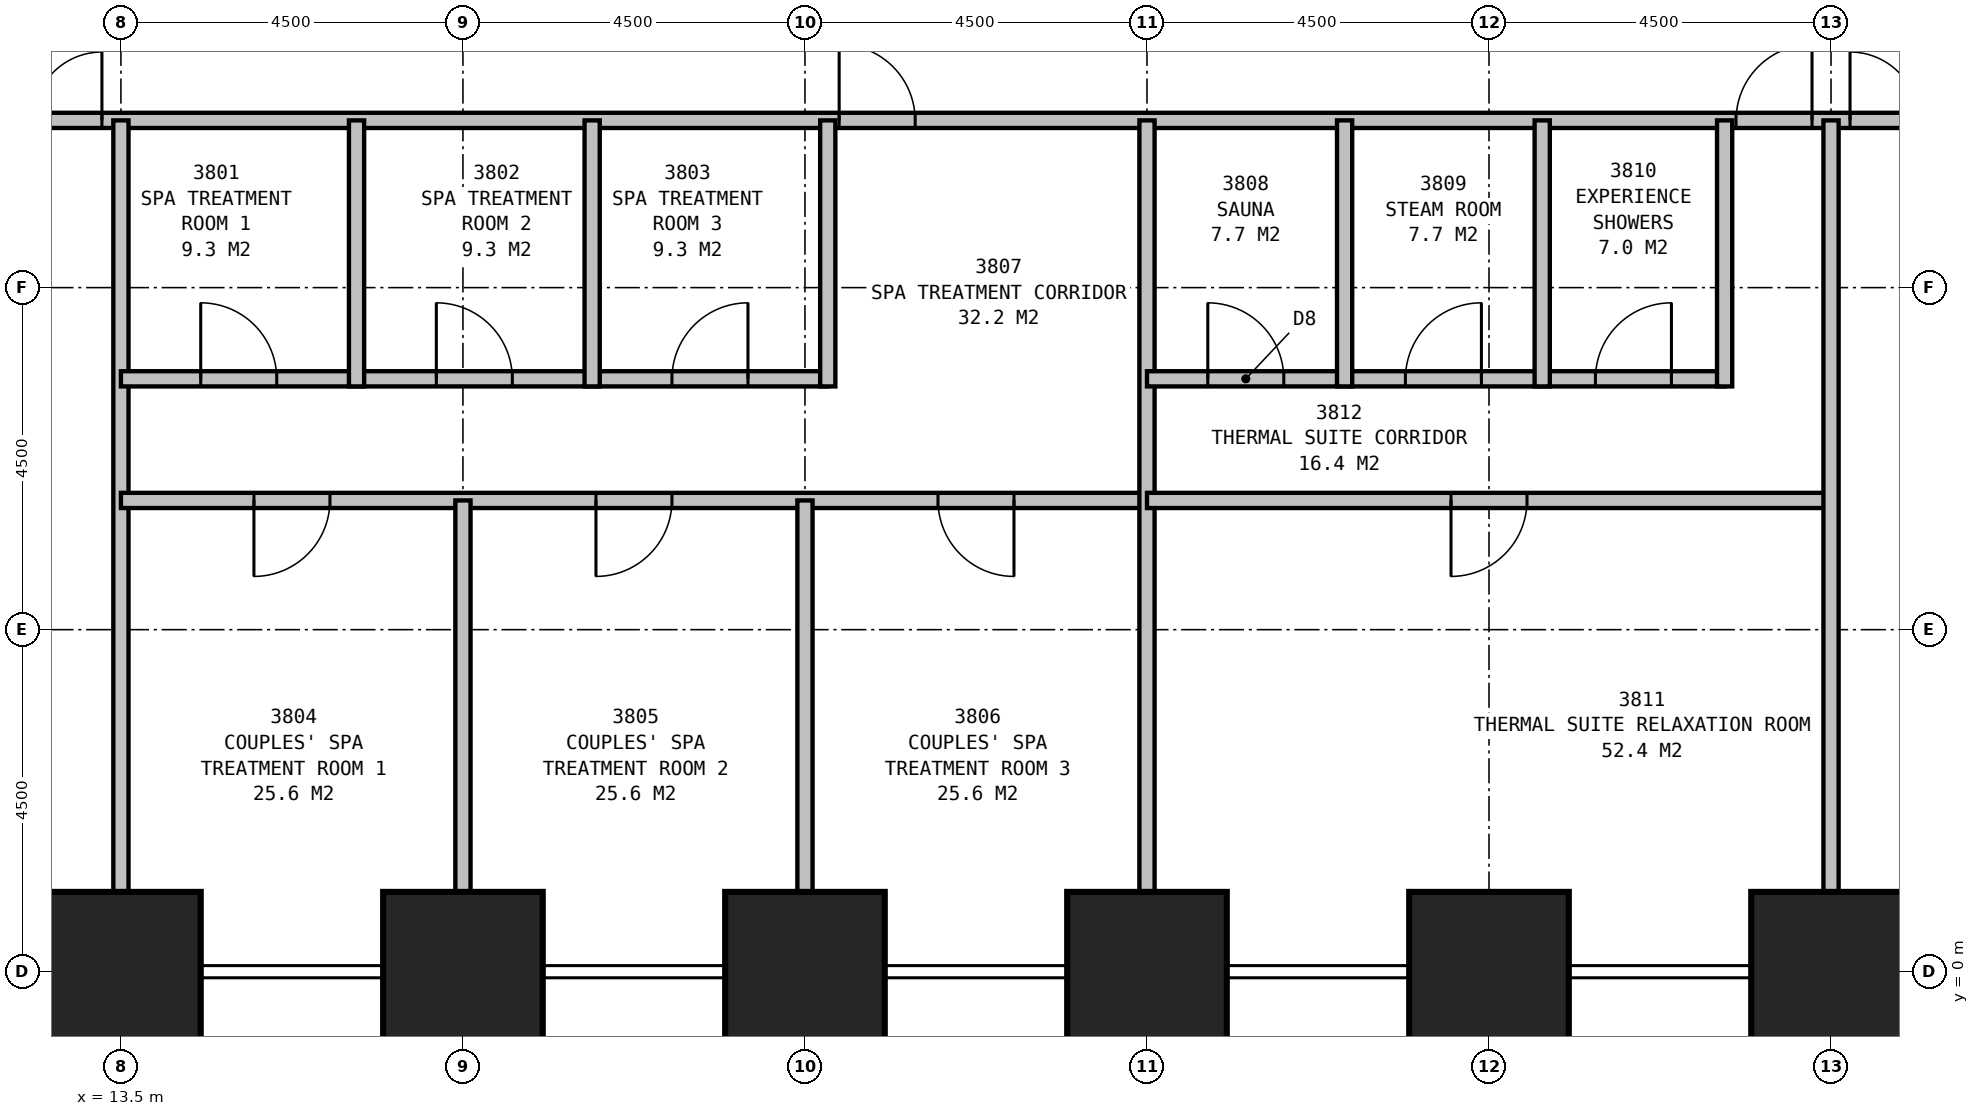
"""IFC4 building model, lengths in metres.
Left out: names, types, materials, properties, quantities, classifications, styles, units other than length and angle.
Written with IfcOpenShell. Run it as: python <this file> out.ifc"""

import sys

from ifc_helpers import new_model, si_unit, direction, frame, frame_2d, origin, origin_2d, place, context, subcontext, project, spatial, rectangle, extrude, element, fill, save


model = new_model("IFC4")
c1 = context("Model", 3, precision=1e-05, world=origin(), true_north=direction((0.0, 1.0)))
c2 = subcontext(c1, "Body", "Model", "MODEL_VIEW")
j1 = project(units=[si_unit("LENGTHUNIT", "METRE"), si_unit("PLANEANGLEUNIT", "RADIAN")], contexts=[c1])
p1 = place(None, origin())
s1 = spatial("IfcSite", under=j1, at=p1, CompositionType="ELEMENT")
p2 = place(p1, origin())
s2 = spatial("IfcBuilding", under=s1, at=p2, CompositionType="ELEMENT")
p3 = place(p2, frame((0.0, 0.0, 145.9)))
s3 = spatial("IfcBuildingStorey", under=s2, at=p3, CompositionType="ELEMENT", Elevation=145.9)
for number, where, z_axis, x_axis in (
    (1, (13.5, 0.0, 0.0), (0.0, 0.0, 1.0), (1.0, 0.0, 0.0)),
    (2, (18.0, 0.0, 0.0), (0.0, 0.0, 1.0), (1.0, 0.0, 0.0)),
    (3, (22.5, 0.0, 0.0), (0.0, 0.0, 1.0), (1.0, 0.0, 0.0)),
    (4, (27.0, 0.0, 0.0), (0.0, 0.0, 1.0), (1.0, 0.0, 0.0)),
    (5, (31.5, 0.0, 0.0), (0.0, 0.0, 1.0), (1.0, 0.0, 0.0)),
    (6, (36.0, 0.0, 0.0), (0.0, 0.0, 1.0), (1.0, 0.0, 0.0)),
):
    element("IfcColumn", number, at=place(p3, frame(where, z_axis=z_axis, x_axis=x_axis)), inside=s3, PredefinedType="COLUMN", context=c2, shape_type="SweptSolid", body=[
        extrude(rectangle(XDim=2.1, YDim=2.1, at=origin_2d()), origin(), (0.0, 0.0, 1.0), 6.0),
    ])
p4 = place(p3, frame((11.2, 11.2, 0.0), z_axis=(0.0, 0.0, 1.0), x_axis=(1.0, 0.0, 0.0)))
e7 = element("IfcWall", 7, at=p4, inside=s3, PredefinedType="PARTITIONING", context=c2, shape_type="SweptSolid", body=[
    extrude(rectangle(XDim=27.1, YDim=0.2, at=frame_2d((13.55, 0.0))), origin(), (0.0, 0.0, 1.0), 5.7),
])
p5 = place(p4, frame((11.75, 0.0, 0.0)))
e8 = element("IfcOpeningElement", 8, at=p5, cuts=e7, PredefinedType="OPENING", context=c2, shape_type="SweptSolid", body=[
    extrude(rectangle(XDim=1.0, YDim=2.1, at=frame_2d((0.5, 1.05))), frame((0.0, 0.11, 0.0), z_axis=(0.0, -1.0, 0.0), x_axis=(1.0, 0.0, 0.0)), (0.0, 0.0, 1.0), 0.22),
])
p6 = place(p4, frame((23.55, 0.0, 0.0)))
e9 = element("IfcOpeningElement", 9, at=p6, cuts=e7, PredefinedType="OPENING", context=c2, shape_type="SweptSolid", body=[
    extrude(rectangle(XDim=1.0, YDim=2.1, at=frame_2d((0.5, 1.05))), frame((0.0, 0.11, 0.0), z_axis=(0.0, -1.0, 0.0), x_axis=(1.0, 0.0, 0.0)), (0.0, 0.0, 1.0), 0.22),
])
p7 = place(p4, frame((0.25, 0.0, 0.0)))
e10 = element("IfcOpeningElement", 10, at=p7, cuts=e7, PredefinedType="OPENING", context=c2, shape_type="SweptSolid", body=[
    extrude(rectangle(XDim=1.8, YDim=2.4, at=frame_2d((0.9, 1.2))), frame((0.0, 0.11, 0.0), z_axis=(0.0, -1.0, 0.0), x_axis=(1.0, 0.0, 0.0)), (0.0, 0.0, 1.0), 0.22),
])
p8 = place(p4, frame((25.05, 0.0, 0.0)))
e11 = element("IfcOpeningElement", 11, at=p8, cuts=e7, PredefinedType="OPENING", context=c2, shape_type="SweptSolid", body=[
    extrude(rectangle(XDim=1.8, YDim=2.4, at=frame_2d((0.9, 1.2))), frame((0.0, 0.11, 0.0), z_axis=(0.0, -1.0, 0.0), x_axis=(1.0, 0.0, 0.0)), (0.0, 0.0, 1.0), 0.22),
])
for number, where, z_axis, x_axis in (
    (12, (13.5, 11.2, 0.0), (0.0, 0.0, 1.0), (0.0, -1.0, 0.0)),
    (13, (27.0, 11.2, 0.0), (0.0, 0.0, 1.0), (0.0, -1.0, 0.0)),
    (14, (36.0, 11.2, 0.0), (0.0, 0.0, 1.0), (0.0, -1.0, 0.0)),
):
    element("IfcWall", number, at=place(p3, frame(where, z_axis=z_axis, x_axis=x_axis)), inside=s3, PredefinedType="PARTITIONING", context=c2, shape_type="SweptSolid", body=[
        extrude(rectangle(XDim=10.15, YDim=0.2, at=frame_2d((5.075, 0.0))), origin(), (0.0, 0.0, 1.0), 4.7),
    ])
for number, where, z_axis, x_axis in (
    (15, (16.6, 11.2, 0.0), (0.0, 0.0, 1.0), (0.0, -1.0, 0.0)),
    (16, (19.7, 11.2, 0.0), (0.0, 0.0, 1.0), (0.0, -1.0, 0.0)),
):
    element("IfcWall", number, at=place(p3, frame(where, z_axis=z_axis, x_axis=x_axis)), inside=s3, PredefinedType="PARTITIONING", context=c2, shape_type="SweptSolid", body=[
        extrude(rectangle(XDim=3.5, YDim=0.2, at=frame_2d((1.75, 0.0))), origin(), (0.0, 0.0, 1.0), 5.7),
    ])
p9 = place(p3, frame((22.8, 11.2, 0.0), z_axis=(0.0, 0.0, 1.0), x_axis=(0.0, -1.0, 0.0)))
e17 = element("IfcWall", 17, at=p9, inside=s3, PredefinedType="PARTITIONING", context=c2, shape_type="SweptSolid", body=[
    extrude(rectangle(XDim=3.5, YDim=0.2, at=frame_2d((1.75, 0.0))), origin(), (0.0, 0.0, 1.0), 4.7),
])
p10 = place(p3, frame((13.5, 7.8, 0.0), z_axis=(0.0, 0.0, 1.0), x_axis=(1.0, 0.0, 0.0)))
e18 = element("IfcWall", 18, at=p10, inside=s3, PredefinedType="PARTITIONING", context=c2, shape_type="SweptSolid", body=[
    extrude(rectangle(XDim=9.3, YDim=0.2, at=frame_2d((4.65, 0.0))), origin(), (0.0, 0.0, 1.0), 5.7),
])
p11 = place(p10, frame((1.05, 0.0, 0.0)))
e19 = element("IfcOpeningElement", 19, at=p11, cuts=e18, PredefinedType="OPENING", context=c2, shape_type="SweptSolid", body=[
    extrude(rectangle(XDim=1.0, YDim=2.1, at=frame_2d((0.5, 1.05))), frame((0.0, 0.11, 0.0), z_axis=(0.0, -1.0, 0.0), x_axis=(1.0, 0.0, 0.0)), (0.0, 0.0, 1.0), 0.22),
])
p12 = place(p10, frame((4.15, 0.0, 0.0)))
e20 = element("IfcOpeningElement", 20, at=p12, cuts=e18, PredefinedType="OPENING", context=c2, shape_type="SweptSolid", body=[
    extrude(rectangle(XDim=1.0, YDim=2.1, at=frame_2d((0.5, 1.05))), frame((0.0, 0.11, 0.0), z_axis=(0.0, -1.0, 0.0), x_axis=(1.0, 0.0, 0.0)), (0.0, 0.0, 1.0), 0.22),
])
p13 = place(p10, frame((7.25, 0.0, 0.0)))
e21 = element("IfcOpeningElement", 21, at=p13, cuts=e18, PredefinedType="OPENING", context=c2, shape_type="SweptSolid", body=[
    extrude(rectangle(XDim=1.0, YDim=2.1, at=frame_2d((0.5, 1.05))), frame((0.0, 0.11, 0.0), z_axis=(0.0, -1.0, 0.0), x_axis=(1.0, 0.0, 0.0)), (0.0, 0.0, 1.0), 0.22),
])
p14 = place(p3, frame((13.5, 6.2, 0.0), z_axis=(0.0, 0.0, 1.0), x_axis=(1.0, 0.0, 0.0)))
e22 = element("IfcWall", 22, at=p14, inside=s3, PredefinedType="PARTITIONING", context=c2, shape_type="SweptSolid", body=[
    extrude(rectangle(XDim=13.5, YDim=0.2, at=frame_2d((6.75, 0.0))), origin(), (0.0, 0.0, 1.0), 5.7),
])
p15 = place(p14, frame((2.75, 0.0, 0.0), z_axis=(0.0, 0.0, 1.0), x_axis=(-1.0, 0.0, 0.0)))
e23 = element("IfcOpeningElement", 23, at=p15, cuts=e22, PredefinedType="OPENING", context=c2, shape_type="SweptSolid", body=[
    extrude(rectangle(XDim=1.0, YDim=2.1, at=frame_2d((0.5, 1.05))), frame((0.0, 0.11, 0.0), z_axis=(0.0, -1.0, 0.0), x_axis=(1.0, 0.0, 0.0)), (0.0, 0.0, 1.0), 0.22),
])
p16 = place(p14, frame((7.25, 0.0, 0.0), z_axis=(0.0, 0.0, 1.0), x_axis=(-1.0, 0.0, 0.0)))
e24 = element("IfcOpeningElement", 24, at=p16, cuts=e22, PredefinedType="OPENING", context=c2, shape_type="SweptSolid", body=[
    extrude(rectangle(XDim=1.0, YDim=2.1, at=frame_2d((0.5, 1.05))), frame((0.0, 0.11, 0.0), z_axis=(0.0, -1.0, 0.0), x_axis=(1.0, 0.0, 0.0)), (0.0, 0.0, 1.0), 0.22),
])
p17 = place(p14, frame((11.75, 0.0, 0.0), z_axis=(0.0, 0.0, 1.0), x_axis=(-1.0, 0.0, 0.0)))
e25 = element("IfcOpeningElement", 25, at=p17, cuts=e22, PredefinedType="OPENING", context=c2, shape_type="SweptSolid", body=[
    extrude(rectangle(XDim=1.0, YDim=2.1, at=frame_2d((0.5, 1.05))), frame((0.0, 0.11, 0.0), z_axis=(0.0, -1.0, 0.0), x_axis=(1.0, 0.0, 0.0)), (0.0, 0.0, 1.0), 0.22),
])
for number, where, z_axis, x_axis in (
    (26, (18.0, 6.2, 0.0), (0.0, 0.0, 1.0), (0.0, -1.0, 0.0)),
    (27, (22.5, 6.2, 0.0), (0.0, 0.0, 1.0), (0.0, -1.0, 0.0)),
):
    element("IfcWall", number, at=place(p3, frame(where, z_axis=z_axis, x_axis=x_axis)), inside=s3, PredefinedType="PARTITIONING", context=c2, shape_type="SweptSolid", body=[
        extrude(rectangle(XDim=5.15, YDim=0.2, at=frame_2d((2.575, 0.0))), origin(), (0.0, 0.0, 1.0), 4.7),
    ])
p18 = place(p3, frame((29.6, 11.2, 0.0), z_axis=(0.0, 0.0, 1.0), x_axis=(0.0, -1.0, 0.0)))
e28 = element("IfcWall", 28, at=p18, inside=s3, PredefinedType="PARTITIONING", context=c2, shape_type="SweptSolid", body=[
    extrude(rectangle(XDim=3.5, YDim=0.2, at=frame_2d((1.75, 0.0))), origin(), (0.0, 0.0, 1.0), 5.7),
])
p19 = place(p3, frame((32.2, 11.2, 0.0), z_axis=(0.0, 0.0, 1.0), x_axis=(0.0, -1.0, 0.0)))
e29 = element("IfcWall", 29, at=p19, inside=s3, PredefinedType="PARTITIONING", context=c2, shape_type="SweptSolid", body=[
    extrude(rectangle(XDim=3.5, YDim=0.2, at=frame_2d((1.75, 0.0))), origin(), (0.0, 0.0, 1.0), 4.7),
])
p20 = place(p3, frame((34.6, 11.2, 0.0), z_axis=(0.0, 0.0, 1.0), x_axis=(0.0, -1.0, 0.0)))
e30 = element("IfcWall", 30, at=p20, inside=s3, PredefinedType="PARTITIONING", context=c2, shape_type="SweptSolid", body=[
    extrude(rectangle(XDim=3.5, YDim=0.2, at=frame_2d((1.75, 0.0))), origin(), (0.0, 0.0, 1.0), 5.7),
])
p21 = place(p3, frame((27.0, 7.8, 0.0), z_axis=(0.0, 0.0, 1.0), x_axis=(1.0, 0.0, 0.0)))
e31 = element("IfcWall", 31, at=p21, inside=s3, PredefinedType="PARTITIONING", context=c2, shape_type="SweptSolid", body=[
    extrude(rectangle(XDim=7.6, YDim=0.2, at=frame_2d((3.8, 0.0))), origin(), (0.0, 0.0, 1.0), 5.7),
])
p22 = place(p21, frame((0.8, 0.0, 0.0)))
e32 = element("IfcOpeningElement", 32, at=p22, cuts=e31, PredefinedType="OPENING", context=c2, shape_type="SweptSolid", body=[
    extrude(rectangle(XDim=1.0, YDim=2.1, at=frame_2d((0.5, 1.05))), frame((0.0, 0.11, 0.0), z_axis=(0.0, -1.0, 0.0), x_axis=(1.0, 0.0, 0.0)), (0.0, 0.0, 1.0), 0.22),
])
p23 = place(p21, frame((3.4, 0.0, 0.0)))
e33 = element("IfcOpeningElement", 33, at=p23, cuts=e31, PredefinedType="OPENING", context=c2, shape_type="SweptSolid", body=[
    extrude(rectangle(XDim=1.0, YDim=2.1, at=frame_2d((0.5, 1.05))), frame((0.0, 0.11, 0.0), z_axis=(0.0, -1.0, 0.0), x_axis=(1.0, 0.0, 0.0)), (0.0, 0.0, 1.0), 0.22),
])
p24 = place(p21, frame((5.9, 0.0, 0.0)))
e34 = element("IfcOpeningElement", 34, at=p24, cuts=e31, PredefinedType="OPENING", context=c2, shape_type="SweptSolid", body=[
    extrude(rectangle(XDim=1.0, YDim=2.1, at=frame_2d((0.5, 1.05))), frame((0.0, 0.11, 0.0), z_axis=(0.0, -1.0, 0.0), x_axis=(1.0, 0.0, 0.0)), (0.0, 0.0, 1.0), 0.22),
])
p25 = place(p3, frame((27.0, 6.2, 0.0), z_axis=(0.0, 0.0, 1.0), x_axis=(1.0, 0.0, 0.0)))
e35 = element("IfcWall", 35, at=p25, inside=s3, PredefinedType="PARTITIONING", context=c2, shape_type="SweptSolid", body=[
    extrude(rectangle(XDim=9.0, YDim=0.2, at=frame_2d((4.5, 0.0))), origin(), (0.0, 0.0, 1.0), 5.7),
])
p26 = place(p25, frame((5.0, 0.0, 0.0), z_axis=(0.0, 0.0, 1.0), x_axis=(-1.0, 0.0, 0.0)))
e36 = element("IfcOpeningElement", 36, at=p26, cuts=e35, PredefinedType="OPENING", context=c2, shape_type="SweptSolid", body=[
    extrude(rectangle(XDim=1.0, YDim=2.1, at=frame_2d((0.5, 1.05))), frame((0.0, 0.11, 0.0), z_axis=(0.0, -1.0, 0.0), x_axis=(1.0, 0.0, 0.0)), (0.0, 0.0, 1.0), 0.22),
])
p27 = place(p5, origin())
e37 = element("IfcDoor", 37, at=p27, inside=s3, OperationType="SINGLE_SWING_LEFT", PredefinedType="DOOR", context=c2, shape_type="SweptSolid", body=[
    extrude(rectangle(XDim=1.0, YDim=2.1, at=frame_2d((0.5, 1.05))), frame((0.0, 0.025, 0.0), z_axis=(0.0, -1.0, 0.0), x_axis=(1.0, 0.0, 0.0)), (0.0, 0.0, 1.0), 0.05),
])
fill(e8, e37)
p28 = place(p6, origin())
e38 = element("IfcDoor", 38, at=p28, inside=s3, OperationType="SINGLE_SWING_RIGHT", PredefinedType="DOOR", context=c2, shape_type="SweptSolid", body=[
    extrude(rectangle(XDim=1.0, YDim=2.1, at=frame_2d((0.5, 1.05))), frame((0.0, 0.025, 0.0), z_axis=(0.0, -1.0, 0.0), x_axis=(1.0, 0.0, 0.0)), (0.0, 0.0, 1.0), 0.05),
])
fill(e9, e38)
p29 = place(p7, origin())
e39 = element("IfcDoor", 39, at=p29, inside=s3, OperationType="DOUBLE_DOOR_SINGLE_SWING", PredefinedType="DOOR", context=c2, shape_type="SweptSolid", body=[
    extrude(rectangle(XDim=1.8, YDim=2.4, at=frame_2d((0.9, 1.2))), frame((0.0, 0.025, 0.0), z_axis=(0.0, -1.0, 0.0), x_axis=(1.0, 0.0, 0.0)), (0.0, 0.0, 1.0), 0.05),
])
fill(e10, e39)
p30 = place(p8, origin())
e40 = element("IfcDoor", 40, at=p30, inside=s3, OperationType="DOUBLE_DOOR_SINGLE_SWING", PredefinedType="DOOR", context=c2, shape_type="SweptSolid", body=[
    extrude(rectangle(XDim=1.8, YDim=2.4, at=frame_2d((0.9, 1.2))), frame((0.0, 0.025, 0.0), z_axis=(0.0, -1.0, 0.0), x_axis=(1.0, 0.0, 0.0)), (0.0, 0.0, 1.0), 0.05),
])
fill(e11, e40)
p31 = place(p11, origin())
e41 = element("IfcDoor", 41, at=p31, inside=s3, OperationType="SINGLE_SWING_LEFT", PredefinedType="DOOR", context=c2, shape_type="SweptSolid", body=[
    extrude(rectangle(XDim=1.0, YDim=2.1, at=frame_2d((0.5, 1.05))), frame((0.0, 0.025, 0.0), z_axis=(0.0, -1.0, 0.0), x_axis=(1.0, 0.0, 0.0)), (0.0, 0.0, 1.0), 0.05),
])
fill(e19, e41)
p32 = place(p12, origin())
e42 = element("IfcDoor", 42, at=p32, inside=s3, OperationType="SINGLE_SWING_LEFT", PredefinedType="DOOR", context=c2, shape_type="SweptSolid", body=[
    extrude(rectangle(XDim=1.0, YDim=2.1, at=frame_2d((0.5, 1.05))), frame((0.0, 0.025, 0.0), z_axis=(0.0, -1.0, 0.0), x_axis=(1.0, 0.0, 0.0)), (0.0, 0.0, 1.0), 0.05),
])
fill(e20, e42)
p33 = place(p13, origin())
e43 = element("IfcDoor", 43, at=p33, inside=s3, OperationType="SINGLE_SWING_RIGHT", PredefinedType="DOOR", context=c2, shape_type="SweptSolid", body=[
    extrude(rectangle(XDim=1.0, YDim=2.1, at=frame_2d((0.5, 1.05))), frame((0.0, 0.025, 0.0), z_axis=(0.0, -1.0, 0.0), x_axis=(1.0, 0.0, 0.0)), (0.0, 0.0, 1.0), 0.05),
])
fill(e21, e43)
p34 = place(p15, origin())
e44 = element("IfcDoor", 44, at=p34, inside=s3, OperationType="SINGLE_SWING_RIGHT", PredefinedType="DOOR", context=c2, shape_type="SweptSolid", body=[
    extrude(rectangle(XDim=1.0, YDim=2.1, at=frame_2d((0.5, 1.05))), frame((0.0, 0.025, 0.0), z_axis=(0.0, -1.0, 0.0), x_axis=(1.0, 0.0, 0.0)), (0.0, 0.0, 1.0), 0.05),
])
fill(e23, e44)
p35 = place(p16, origin())
e45 = element("IfcDoor", 45, at=p35, inside=s3, OperationType="SINGLE_SWING_RIGHT", PredefinedType="DOOR", context=c2, shape_type="SweptSolid", body=[
    extrude(rectangle(XDim=1.0, YDim=2.1, at=frame_2d((0.5, 1.05))), frame((0.0, 0.025, 0.0), z_axis=(0.0, -1.0, 0.0), x_axis=(1.0, 0.0, 0.0)), (0.0, 0.0, 1.0), 0.05),
])
fill(e24, e45)
p36 = place(p17, origin())
e46 = element("IfcDoor", 46, at=p36, inside=s3, OperationType="SINGLE_SWING_LEFT", PredefinedType="DOOR", context=c2, shape_type="SweptSolid", body=[
    extrude(rectangle(XDim=1.0, YDim=2.1, at=frame_2d((0.5, 1.05))), frame((0.0, 0.025, 0.0), z_axis=(0.0, -1.0, 0.0), x_axis=(1.0, 0.0, 0.0)), (0.0, 0.0, 1.0), 0.05),
])
fill(e25, e46)
p37 = place(p22, origin())
e47 = element("IfcDoor", 47, at=p37, inside=s3, OperationType="SINGLE_SWING_LEFT", PredefinedType="DOOR", context=c2, shape_type="SweptSolid", body=[
    extrude(rectangle(XDim=1.0, YDim=2.1, at=frame_2d((0.5, 1.05))), frame((0.0, 0.025, 0.0), z_axis=(0.0, -1.0, 0.0), x_axis=(1.0, 0.0, 0.0)), (0.0, 0.0, 1.0), 0.05),
])
fill(e32, e47)
p38 = place(p23, origin())
e48 = element("IfcDoor", 48, at=p38, inside=s3, OperationType="SINGLE_SWING_RIGHT", PredefinedType="DOOR", context=c2, shape_type="SweptSolid", body=[
    extrude(rectangle(XDim=1.0, YDim=2.1, at=frame_2d((0.5, 1.05))), frame((0.0, 0.025, 0.0), z_axis=(0.0, -1.0, 0.0), x_axis=(1.0, 0.0, 0.0)), (0.0, 0.0, 1.0), 0.05),
])
fill(e33, e48)
p39 = place(p24, origin())
e49 = element("IfcDoor", 49, at=p39, inside=s3, OperationType="SINGLE_SWING_RIGHT", PredefinedType="DOOR", context=c2, shape_type="SweptSolid", body=[
    extrude(rectangle(XDim=1.0, YDim=2.1, at=frame_2d((0.5, 1.05))), frame((0.0, 0.025, 0.0), z_axis=(0.0, -1.0, 0.0), x_axis=(1.0, 0.0, 0.0)), (0.0, 0.0, 1.0), 0.05),
])
fill(e34, e49)
p40 = place(p26, origin())
e50 = element("IfcDoor", 50, at=p40, inside=s3, OperationType="SINGLE_SWING_RIGHT", PredefinedType="DOOR", context=c2, shape_type="SweptSolid", body=[
    extrude(rectangle(XDim=1.0, YDim=2.1, at=frame_2d((0.5, 1.05))), frame((0.0, 0.025, 0.0), z_axis=(0.0, -1.0, 0.0), x_axis=(1.0, 0.0, 0.0)), (0.0, 0.0, 1.0), 0.05),
])
fill(e36, e50)
save(model, sys.argv[1])
